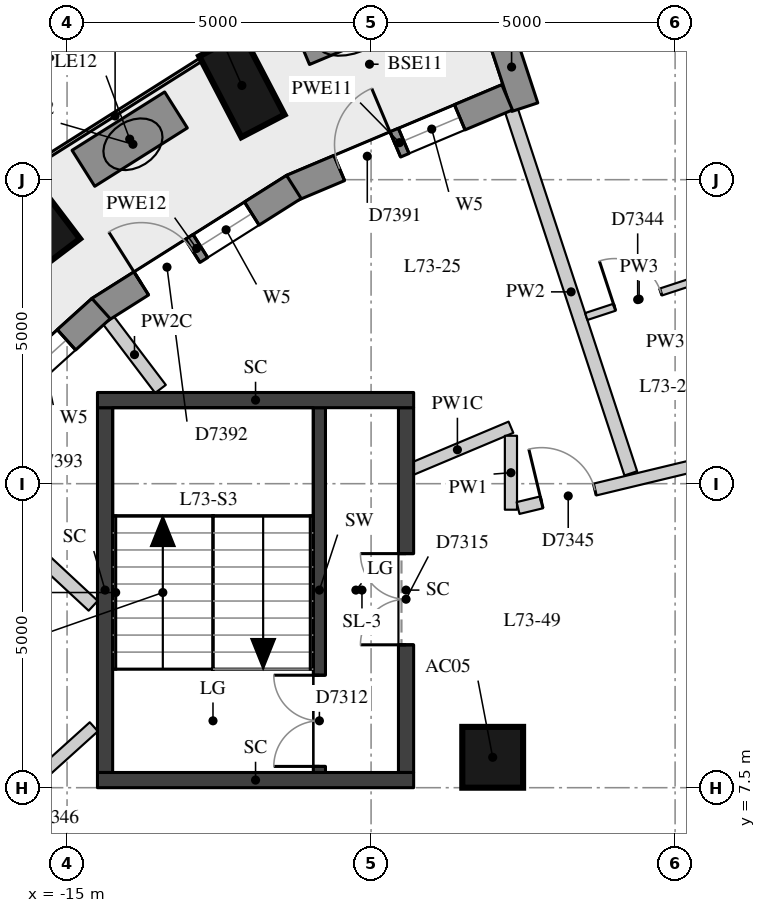
"""IFC4 building model, lengths in metres.
Left out: names, types, materials, properties, quantities, classifications, styles, units other than length and angle.
Written with IfcOpenShell. Run it as: python <this file> out.ifc"""

import sys

from ifc_helpers import new_model, si_unit, direction, frame, frame_2d, origin, origin_2d, place, context, subcontext, project, spatial, rectangle, extrude, element, fill, save


model = new_model("IFC4")
c1 = context("Model", 3, precision=1e-05, world=origin(), true_north=direction((0.0, 1.0)))
c2 = subcontext(c1, "Body", "Model", "MODEL_VIEW")
j1 = project(units=[si_unit("LENGTHUNIT", "METRE"), si_unit("PLANEANGLEUNIT", "RADIAN")], contexts=[c1])
p1 = place(None, origin())
s1 = spatial("IfcSite", under=j1, at=p1, CompositionType="ELEMENT")
p2 = place(p1, origin())
s2 = spatial("IfcBuilding", under=s1, at=p2, CompositionType="ELEMENT")
p3 = place(p2, frame((0.0, 0.0, 256.4)))
s3 = spatial("IfcBuildingStorey", under=s2, at=p3, CompositionType="ELEMENT", Elevation=256.4)
for number, where, z_axis, x_axis in (
    (1, (-12.125, 19.05, 0.0), (0.0, 0.0, 1.0), (-0.462, 0.887, 0.0)),
    (2, (-15.559, 16.885, 0.0), (0.0, 0.0, 1.0), (-0.604, 0.797, 0.0)),
):
    element("IfcColumn", number, at=place(p3, frame(where, z_axis=z_axis, x_axis=x_axis)), inside=s3, PredefinedType="COLUMN", context=c2, shape_type="SweptSolid", body=[
        extrude(rectangle(XDim=1.5, YDim=0.8, at=origin_2d()), origin(), (0.0, 0.0, 1.0), 3.3),
    ])
p4 = place(p3, frame((-8.0, 8.0, 0.0), z_axis=(0.0, 0.0, 1.0), x_axis=(1.0, 0.0, 0.0)))
e3 = element("IfcColumn", 3, at=p4, inside=s3, PredefinedType="COLUMN", context=c2, shape_type="SweptSolid", body=[
    extrude(rectangle(XDim=1.0, YDim=1.0, at=origin_2d()), origin(), (0.0, 0.0, 1.0), 3.3),
])
p5 = place(p3, frame((-7.906, 20.014, 0.0), z_axis=(0.0, 0.0, 1.0), x_axis=(0.312379684595, -0.949957332017, 0.0)))
e4 = element("IfcWall", 4, at=p5, inside=s3, PredefinedType="SOLIDWALL", context=c2, shape_type="SweptSolid", body=[
    extrude(rectangle(XDim=1.39, YDim=0.45, at=frame_2d((0.695, 0.0))), origin(), (0.0, 0.0, 1.0), 2.95),
])
p6 = place(p3, frame((-7.762, 18.855, 0.0), z_axis=(0.0, 0.0, 1.0), x_axis=(-0.921611451737, -0.388113813239, 0.0)))
e5 = element("IfcWall", 5, at=p6, inside=s3, PredefinedType="SOLIDWALL", context=c2, shape_type="SweptSolid", body=[
    extrude(rectangle(XDim=3.842, YDim=0.45, at=frame_2d((1.921, 0.0))), origin(), (0.0, 0.0, 1.0), 2.95),
])
p7 = place(p6, frame((0.846, 0.0, 0.4)))
e6 = element("IfcOpeningElement", 6, at=p7, cuts=e5, PredefinedType="OPENING", context=c2, shape_type="SweptSolid", body=[
    extrude(rectangle(XDim=1.0, YDim=1.75, at=frame_2d((0.5, 0.875))), frame((0.0, 0.235, 0.0), z_axis=(0.0, -1.0, 0.0), x_axis=(1.0, 0.0, 0.0)), (0.0, 0.0, 1.0), 0.47),
])
p8 = place(p6, frame((1.996, 0.0, 0.0)))
e7 = element("IfcOpeningElement", 7, at=p8, cuts=e5, PredefinedType="OPENING", context=c2, shape_type="SweptSolid", body=[
    extrude(rectangle(XDim=1.0, YDim=2.15, at=frame_2d((0.5, 1.075))), frame((0.0, 0.235, 0.0), z_axis=(0.0, -1.0, 0.0), x_axis=(1.0, 0.0, 0.0)), (0.0, 0.0, 1.0), 0.47),
])
p9 = place(p3, frame((-11.27, 17.381, 0.0), z_axis=(0.0, 0.0, 1.0), x_axis=(-0.845176295427, -0.534487632831, 0.0)))
e8 = element("IfcWall", 8, at=p9, inside=s3, PredefinedType="SOLIDWALL", context=c2, shape_type="SweptSolid", body=[
    extrude(rectangle(XDim=3.788, YDim=0.45, at=frame_2d((1.894, 0.0))), origin(), (0.0, 0.0, 1.0), 2.95),
])
p10 = place(p9, frame((0.819, 0.0, 0.4)))
e9 = element("IfcOpeningElement", 9, at=p10, cuts=e8, PredefinedType="OPENING", context=c2, shape_type="SweptSolid", body=[
    extrude(rectangle(XDim=1.0, YDim=1.75, at=frame_2d((0.5, 0.875))), frame((0.0, 0.235, 0.0), z_axis=(0.0, -1.0, 0.0), x_axis=(1.0, 0.0, 0.0)), (0.0, 0.0, 1.0), 0.47),
])
p11 = place(p9, frame((1.969, 0.0, 0.0)))
e10 = element("IfcOpeningElement", 10, at=p11, cuts=e8, PredefinedType="OPENING", context=c2, shape_type="SweptSolid", body=[
    extrude(rectangle(XDim=1.0, YDim=2.15, at=frame_2d((0.5, 1.075))), frame((0.0, 0.235, 0.0), z_axis=(0.0, -1.0, 0.0), x_axis=(1.0, 0.0, 0.0)), (0.0, 0.0, 1.0), 0.47),
])
p12 = place(p3, frame((-14.441, 15.38, 0.0), z_axis=(0.0, 0.0, 1.0), x_axis=(-0.742152631569, -0.670230909057, 0.0)))
e11 = element("IfcWall", 11, at=p12, inside=s3, PredefinedType="SOLIDWALL", context=c2, shape_type="SweptSolid", body=[
    extrude(rectangle(XDim=3.683, YDim=0.45, at=frame_2d((1.842, 0.0))), origin(), (0.0, 0.0, 1.0), 2.95),
])
p13 = place(p12, frame((0.767, 0.0, 0.4)))
e12 = element("IfcOpeningElement", 12, at=p13, cuts=e11, PredefinedType="OPENING", context=c2, shape_type="SweptSolid", body=[
    extrude(rectangle(XDim=1.0, YDim=1.75, at=frame_2d((0.5, 0.875))), frame((0.0, 0.235, 0.0), z_axis=(0.0, -1.0, 0.0), x_axis=(1.0, 0.0, 0.0)), (0.0, 0.0, 1.0), 0.47),
])
p14 = place(p12, frame((1.917, 0.0, 0.0)))
e13 = element("IfcOpeningElement", 13, at=p14, cuts=e11, PredefinedType="OPENING", context=c2, shape_type="SweptSolid", body=[
    extrude(rectangle(XDim=1.0, YDim=2.15, at=frame_2d((0.5, 1.075))), frame((0.0, 0.235, 0.0), z_axis=(0.0, -1.0, 0.0), x_axis=(1.0, 0.0, 0.0)), (0.0, 0.0, 1.0), 0.47),
])
for number, where, z_axis, x_axis in (
    (14, (-9.488, 20.414, 0.0), (0.0, 0.0, 1.0), (-0.922, -0.387, 0.0)),
    (15, (-13.208, 18.647, 0.0), (0.0, 0.0, 1.0), (-0.846, -0.533, 0.0)),
):
    element("IfcWall", number, at=place(p3, frame(where, z_axis=z_axis, x_axis=x_axis)), inside=s3, PredefinedType="USERDEFINED", context=c2, shape_type="SweptSolid", body=[
        extrude(rectangle(XDim=1.8, YDim=0.7, at=frame_2d((0.9, 0.0))), origin(), (0.0, 0.0, 1.0), 0.75),
    ])
p15 = place(p3, frame((-10.85, 7.75, 0.0), z_axis=(0.0, 0.0, 1.0), x_axis=(0.0, 1.0, 0.0)))
e16 = element("IfcWall", 16, at=p15, inside=s3, PredefinedType="SHEAR", context=c2, shape_type="SweptSolid", body=[
    extrude(rectangle(XDim=6.0, YDim=0.2, at=frame_2d((3.0, 0.0))), origin(), (0.0, 0.0, 1.0), 2.95),
])
p16 = place(p15, frame((0.1, 0.0, 0.0)))
e17 = element("IfcOpeningElement", 17, at=p16, cuts=e16, PredefinedType="OPENING", context=c2, shape_type="SweptSolid", body=[
    extrude(rectangle(XDim=1.5, YDim=2.1, at=frame_2d((0.75, 1.05))), frame((0.0, 0.11, 0.0), z_axis=(0.0, -1.0, 0.0), x_axis=(1.0, 0.0, 0.0)), (0.0, 0.0, 1.0), 0.22),
])
p17 = place(p3, frame((-14.375, 7.75, -0.28), z_axis=(0.0, 0.0, 1.0), x_axis=(0.0, 1.0, 0.0)))
e18 = element("IfcWall", 18, at=p17, inside=s3, PredefinedType="SHEAR", context=c2, shape_type="SweptSolid", body=[
    extrude(rectangle(XDim=6.0, YDim=0.25, at=frame_2d((3.0, 0.0))), origin(), (0.0, 0.0, 1.0), 3.23),
])
p18 = place(p3, frame((-9.425, 7.75, -0.28), z_axis=(0.0, 0.0, 1.0), x_axis=(0.0, 1.0, 0.0)))
e19 = element("IfcWall", 19, at=p18, inside=s3, PredefinedType="SHEAR", context=c2, shape_type="SweptSolid", body=[
    extrude(rectangle(XDim=6.0, YDim=0.25, at=frame_2d((3.0, 0.0))), origin(), (0.0, 0.0, 1.0), 3.23),
])
p19 = place(p18, frame((2.1, 0.0, 0.28)))
e20 = element("IfcOpeningElement", 20, at=p19, cuts=e19, PredefinedType="OPENING", context=c2, shape_type="SweptSolid", body=[
    extrude(rectangle(XDim=1.5, YDim=2.1, at=frame_2d((0.75, 1.05))), frame((0.0, 0.135, 0.0), z_axis=(0.0, -1.0, 0.0), x_axis=(1.0, 0.0, 0.0)), (0.0, 0.0, 1.0), 0.27),
])
for number, where, z_axis, x_axis in (
    (21, (-14.5, 13.875, -0.28), (0.0, 0.0, 1.0), (1.0, 0.0, 0.0)),
    (22, (-14.5, 7.625, -0.28), (0.0, 0.0, 1.0), (1.0, 0.0, 0.0)),
):
    element("IfcWall", number, at=place(p3, frame(where, z_axis=z_axis, x_axis=x_axis)), inside=s3, PredefinedType="SHEAR", context=c2, shape_type="SweptSolid", body=[
        extrude(rectangle(XDim=5.2, YDim=0.25, at=frame_2d((2.6, 0.0))), origin(), (0.0, 0.0, 1.0), 3.23),
    ])
p20 = place(p3, frame((-16.24, 6.984, 0.0), z_axis=(0.0, 0.0, 1.0), x_axis=(0.742140692687, 0.67024412885, 0.0)))
e23 = element("IfcWall", 23, at=p20, inside=s3, PredefinedType="PARTITIONING", context=c2, shape_type="SweptSolid", body=[
    extrude(rectangle(XDim=2.265, YDim=0.2, at=frame_2d((1.132, 0.0))), origin(), (0.0, 0.0, 1.0), 2.95),
])
p21 = place(p3, frame((-9.46, 12.687, 0.0), z_axis=(0.0, 0.0, 1.0), x_axis=(0.92164499827, 0.388034144328, 0.0)))
e24 = element("IfcWall", 24, at=p21, inside=s3, PredefinedType="PARTITIONING", context=c2, shape_type="SweptSolid", body=[
    extrude(rectangle(XDim=1.91, YDim=0.2, at=frame_2d((0.955, 0.0))), origin(), (0.0, 0.0, 1.0), 2.5),
])
p22 = place(p3, frame((-7.7, 13.288, 0.0), z_axis=(0.0, 0.0, 1.0), x_axis=(0.0, -1.0, 0.0)))
e25 = element("IfcWall", 25, at=p22, inside=s3, PredefinedType="PARTITIONING", context=c2, shape_type="SweptSolid", body=[
    extrude(rectangle(XDim=1.216, YDim=0.2, at=frame_2d((0.608, 0.0))), origin(), (0.0, 0.0, 1.0), 2.95),
])
p23 = place(p3, frame((-7.583, 12.1, 0.0), z_axis=(0.0, 0.0, 1.0), x_axis=(0.97226305798, 0.233890029903, 0.0)))
e26 = element("IfcWall", 26, at=p23, inside=s3, PredefinedType="PARTITIONING", context=c2, shape_type="SweptSolid", body=[
    extrude(rectangle(XDim=7.696, YDim=0.2, at=frame_2d((3.848, 0.0))), origin(), (0.0, 0.0, 1.0), 2.95),
])
p24 = place(p23, frame((5.85, 0.0, 0.0)))
e27 = element("IfcOpeningElement", 27, at=p24, cuts=e26, PredefinedType="OPENING", context=c2, shape_type="SweptSolid", body=[
    extrude(rectangle(XDim=1.1, YDim=2.1, at=frame_2d((0.55, 1.05))), frame((0.0, 0.11, 0.0), z_axis=(0.0, -1.0, 0.0), x_axis=(1.0, 0.0, 0.0)), (0.0, 0.0, 1.0), 0.22),
])
p25 = place(p23, frame((0.399, 0.0, 0.0)))
e28 = element("IfcOpeningElement", 28, at=p25, cuts=e26, PredefinedType="OPENING", context=c2, shape_type="SweptSolid", body=[
    extrude(rectangle(XDim=0.9, YDim=2.1, at=frame_2d((0.45, 1.05))), frame((0.0, 0.11, 0.0), z_axis=(0.0, -1.0, 0.0), x_axis=(1.0, 0.0, 0.0)), (0.0, 0.0, 1.0), 0.22),
])
p26 = place(p3, frame((-7.692, 18.64, 0.0), z_axis=(0.0, 0.0, 1.0), x_axis=(0.312298025569, -0.949984180514, 0.0)))
e29 = element("IfcWall", 29, at=p26, inside=s3, PredefinedType="PARTITIONING", context=c2, shape_type="SweptSolid", body=[
    extrude(rectangle(XDim=6.285, YDim=0.22, at=frame_2d((3.143, 0.0))), origin(), (0.0, 0.0, 1.0), 2.95),
])
p27 = place(p3, frame((-14.319, 15.187, 0.0), z_axis=(0.0, 0.0, 1.0), x_axis=(0.603937349714, -0.797031792101, 0.0)))
e30 = element("IfcWall", 30, at=p27, inside=s3, PredefinedType="PARTITIONING", context=c2, shape_type="SweptSolid", body=[
    extrude(rectangle(XDim=1.416, YDim=0.22, at=frame_2d((0.708, 0.0))), origin(), (0.0, 0.0, 1.0), 2.5),
])
p28 = place(p3, frame((-17.009, 12.758, 0.0), z_axis=(0.0, 0.0, 1.0), x_axis=(0.732631495403, -0.680625515202, 0.0)))
e31 = element("IfcWall", 31, at=p28, inside=s3, PredefinedType="PARTITIONING", context=c2, shape_type="SweptSolid", body=[
    extrude(rectangle(XDim=3.328, YDim=0.22, at=frame_2d((1.664, 0.0))), origin(), (0.0, 0.0, 1.0), 2.95),
])
p29 = place(p3, frame((-22.004, 7.424, 0.0), z_axis=(0.0, 0.0, 1.0), x_axis=(0.927533826991, -0.373739213607, 0.0)))
e32 = element("IfcWall", 32, at=p29, inside=s3, PredefinedType="PARTITIONING", context=c2, shape_type="SweptSolid", body=[
    extrude(rectangle(XDim=7.614, YDim=0.22, at=frame_2d((3.807, 0.0))), origin(), (0.0, 0.0, 1.0), 2.95),
])
p30 = place(p3, frame((-4.722, 15.821, 0.0), z_axis=(0.0, 0.0, 1.0), x_axis=(-0.949995576072, -0.312263359111, 0.0)))
e33 = element("IfcWall", 33, at=p30, inside=s3, PredefinedType="PARTITIONING", context=c2, shape_type="SweptSolid", body=[
    extrude(rectangle(XDim=1.83, YDim=0.12, at=frame_2d((0.915, 0.0))), origin(), (0.0, 0.0, 1.0), 2.95),
])
p31 = place(p30, frame((0.54, 0.0, 0.0)))
e34 = element("IfcOpeningElement", 34, at=p31, cuts=e33, PredefinedType="OPENING", context=c2, shape_type="SweptSolid", body=[
    extrude(rectangle(XDim=0.8, YDim=2.1, at=frame_2d((0.4, 1.05))), frame((0.0, 0.07, 0.0), z_axis=(0.0, -1.0, 0.0), x_axis=(1.0, 0.0, 0.0)), (0.0, 0.0, 1.0), 0.14),
])
p32 = place(p7, origin())
e35 = element("IfcWindow", 35, at=p32, inside=s3, PartitioningType="SINGLE_PANEL", PredefinedType="WINDOW", context=c2, shape_type="SweptSolid", body=[
    extrude(rectangle(XDim=1.0, YDim=1.75, at=frame_2d((0.5, 0.875))), frame((0.0, 0.035, 0.0), z_axis=(0.0, -1.0, 0.0), x_axis=(1.0, 0.0, 0.0)), (0.0, 0.0, 1.0), 0.06),
])
fill(e6, e35)
p33 = place(p8, frame((1.0, 0.0, 0.0), z_axis=(0.0, 0.0, 1.0), x_axis=(-1.0, 0.0, 0.0)))
e36 = element("IfcDoor", 36, at=p33, inside=s3, OperationType="SINGLE_SWING_RIGHT", PredefinedType="DOOR", context=c2, shape_type="SweptSolid", body=[
    extrude(rectangle(XDim=1.0, YDim=2.15, at=frame_2d((0.5, 1.075))), frame((0.0, 0.075, 0.0), z_axis=(0.0, -1.0, 0.0), x_axis=(1.0, 0.0, 0.0)), (0.0, 0.0, 1.0), 0.05),
])
fill(e7, e36)
p34 = place(p10, origin())
e37 = element("IfcWindow", 37, at=p34, inside=s3, PartitioningType="SINGLE_PANEL", PredefinedType="WINDOW", context=c2, shape_type="SweptSolid", body=[
    extrude(rectangle(XDim=1.0, YDim=1.75, at=frame_2d((0.5, 0.875))), frame((0.0, 0.035, 0.0), z_axis=(0.0, -1.0, 0.0), x_axis=(1.0, 0.0, 0.0)), (0.0, 0.0, 1.0), 0.06),
])
fill(e9, e37)
p35 = place(p11, frame((1.0, 0.0, 0.0), z_axis=(0.0, 0.0, 1.0), x_axis=(-1.0, 0.0, 0.0)))
e38 = element("IfcDoor", 38, at=p35, inside=s3, OperationType="SINGLE_SWING_LEFT", PredefinedType="DOOR", context=c2, shape_type="SweptSolid", body=[
    extrude(rectangle(XDim=1.0, YDim=2.15, at=frame_2d((0.5, 1.075))), frame((0.0, 0.075, 0.0), z_axis=(0.0, -1.0, 0.0), x_axis=(1.0, 0.0, 0.0)), (0.0, 0.0, 1.0), 0.05),
])
fill(e10, e38)
p36 = place(p13, origin())
e39 = element("IfcWindow", 39, at=p36, inside=s3, PartitioningType="SINGLE_PANEL", PredefinedType="WINDOW", context=c2, shape_type="SweptSolid", body=[
    extrude(rectangle(XDim=1.0, YDim=1.75, at=frame_2d((0.5, 0.875))), frame((0.0, 0.035, 0.0), z_axis=(0.0, -1.0, 0.0), x_axis=(1.0, 0.0, 0.0)), (0.0, 0.0, 1.0), 0.06),
])
fill(e12, e39)
p37 = place(p16, origin())
e40 = element("IfcDoor", 40, at=p37, inside=s3, OperationType="DOUBLE_DOOR_SINGLE_SWING", PredefinedType="DOOR", context=c2, shape_type="SweptSolid", body=[
    extrude(rectangle(XDim=1.5, YDim=2.1, at=frame_2d((0.75, 1.05))), frame((0.0, 0.025, 0.0), z_axis=(0.0, -1.0, 0.0), x_axis=(1.0, 0.0, 0.0)), (0.0, 0.0, 1.0), 0.05),
])
fill(e17, e40)
p38 = place(p19, origin())
e41 = element("IfcDoor", 41, at=p38, inside=s3, OperationType="DOUBLE_DOOR_SINGLE_SWING", PredefinedType="DOOR", context=c2, shape_type="SweptSolid", body=[
    extrude(rectangle(XDim=1.5, YDim=2.1, at=frame_2d((0.75, 1.05))), frame((0.0, 0.025, 0.0), z_axis=(0.0, -1.0, 0.0), x_axis=(1.0, 0.0, 0.0)), (0.0, 0.0, 1.0), 0.05),
])
fill(e20, e41)
p39 = place(p31, origin())
e42 = element("IfcDoor", 42, at=p39, inside=s3, OperationType="SINGLE_SWING_LEFT", PredefinedType="DOOR", context=c2, shape_type="SweptSolid", body=[
    extrude(rectangle(XDim=0.8, YDim=2.1, at=frame_2d((0.4, 1.05))), frame((0.0, 0.025, 0.0), z_axis=(0.0, -1.0, 0.0), x_axis=(1.0, 0.0, 0.0)), (0.0, 0.0, 1.0), 0.05),
])
fill(e34, e42)
p40 = place(p25, origin())
e43 = element("IfcDoor", 43, at=p40, inside=s3, OperationType="SINGLE_SWING_LEFT", PredefinedType="DOOR", context=c2, shape_type="SweptSolid", body=[
    extrude(rectangle(XDim=0.9, YDim=2.1, at=frame_2d((0.45, 1.05))), frame((0.0, 0.025, 0.0), z_axis=(0.0, -1.0, 0.0), x_axis=(1.0, 0.0, 0.0)), (0.0, 0.0, 1.0), 0.05),
])
fill(e28, e43)
save(model, sys.argv[1])
